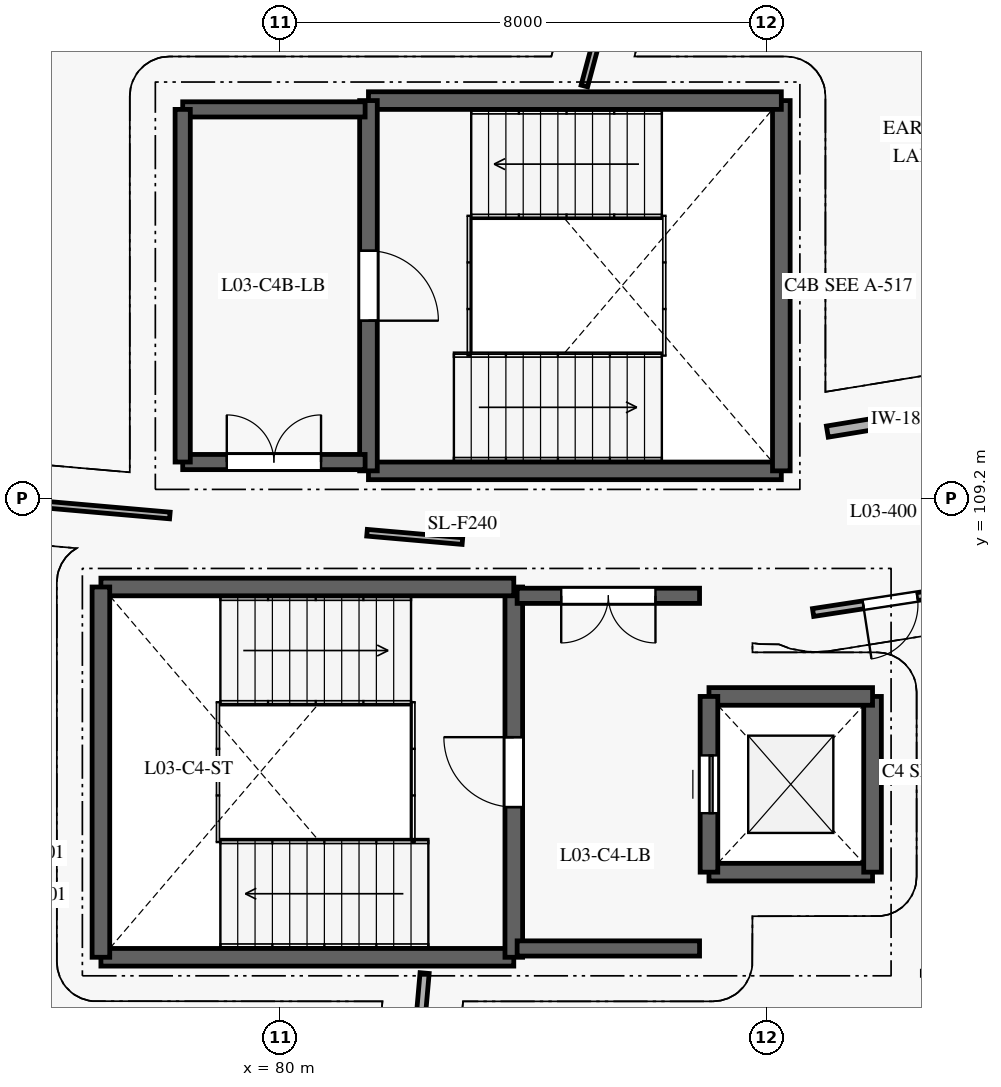
"""IFC4 building model, lengths in metres.
Left out: names, types, materials, properties, quantities, classifications, styles, units other than length and angle.
Written with IfcOpenShell. Run it as: python <this file> out.ifc"""

import sys

from ifc_helpers import new_model, si_unit, direction, frame, frame_2d, origin, place, context, subcontext, project, spatial, rectangle, extrude, element, fill, save


model = new_model("IFC4")
c1 = context("Model", 3, precision=1e-05, world=origin(), true_north=direction((0.0, 1.0)))
c2 = subcontext(c1, "Body", "Model", "MODEL_VIEW")
j1 = project(units=[si_unit("LENGTHUNIT", "METRE"), si_unit("PLANEANGLEUNIT", "RADIAN")], contexts=[c1])
p1 = place(None, origin())
s1 = spatial("IfcSite", under=j1, at=p1, CompositionType="ELEMENT")
p2 = place(p1, origin())
s2 = spatial("IfcBuilding", under=s1, at=p2, CompositionType="ELEMENT")
p3 = place(p2, frame((0.0, 0.0, 12.6)))
s3 = spatial("IfcBuildingStorey", under=s2, at=p3, CompositionType="ELEMENT", Elevation=12.6)
p4 = place(p3, frame((89.75, 120.396, 0.0), z_axis=(0.0, 0.0, 1.0), x_axis=(0.738102453677, -0.674688645136, 0.0)))
e1 = element("IfcWall", 1, at=p4, inside=s3, PredefinedType="SOLIDWALL", context=c2, shape_type="SweptSolid", body=[
    extrude(rectangle(XDim=7.122, YDim=0.425, at=frame_2d((3.561, 0.0))), origin(), (0.0, 0.0, 1.0), 3.94),
])
p5 = place(p4, frame((0.956, 0.0, 0.85)))
e2 = element("IfcOpeningElement", 2, at=p5, cuts=e1, PredefinedType="OPENING", context=c2, shape_type="SweptSolid", body=[
    extrude(rectangle(XDim=1.65, YDim=1.6, at=frame_2d((0.825, 0.8))), frame((0.0, 0.222, 0.0), z_axis=(0.0, -1.0, 0.0), x_axis=(1.0, 0.0, 0.0)), (0.0, 0.0, 1.0), 0.445),
])
p6 = place(p4, frame((3.911, 0.0, 0.85)))
e3 = element("IfcOpeningElement", 3, at=p6, cuts=e1, PredefinedType="OPENING", context=c2, shape_type="SweptSolid", body=[
    extrude(rectangle(XDim=0.85, YDim=1.4, at=frame_2d((0.425, 0.7))), frame((0.0, 0.222, 0.0), z_axis=(0.0, -1.0, 0.0), x_axis=(1.0, 0.0, 0.0)), (0.0, 0.0, 1.0), 0.445),
])
p7 = place(p3, frame((77.055, 101.655, 0.0), z_axis=(0.0, 0.0, 1.0), x_axis=(1.0, 0.0, 0.0)))
e4 = element("IfcWall", 4, at=p7, inside=s3, PredefinedType="SHEAR", context=c2, shape_type="SweptSolid", body=[
    extrude(rectangle(XDim=6.79, YDim=0.29, at=frame_2d((3.395, 0.0))), origin(), (0.0, 0.0, 1.0), 3.95),
])
p8 = place(p3, frame((83.845, 101.655, 0.0), z_axis=(0.0, 0.0, 1.0), x_axis=(0.0, 1.0, 0.0)))
e5 = element("IfcWall", 5, at=p8, inside=s3, PredefinedType="SHEAR", context=c2, shape_type="SweptSolid", body=[
    extrude(rectangle(XDim=6.09, YDim=0.29, at=frame_2d((3.045, 0.0))), origin(), (0.0, 0.0, 1.0), 3.95),
])
p9 = place(p8, frame((2.47, 0.0, 0.0)))
e6 = element("IfcOpeningElement", 6, at=p9, cuts=e5, PredefinedType="OPENING", context=c2, shape_type="SweptSolid", body=[
    extrude(rectangle(XDim=1.15, YDim=2.1, at=frame_2d((0.575, 1.05))), frame((0.0, 0.155, 0.0), z_axis=(0.0, -1.0, 0.0), x_axis=(1.0, 0.0, 0.0)), (0.0, 0.0, 1.0), 0.31),
])
p10 = place(p3, frame((83.845, 107.745, 0.0), z_axis=(0.0, 0.0, 1.0), x_axis=(-1.0, 0.0, 0.0)))
e7 = element("IfcWall", 7, at=p10, inside=s3, PredefinedType="SHEAR", context=c2, shape_type="SweptSolid", body=[
    extrude(rectangle(XDim=6.79, YDim=0.29, at=frame_2d((3.395, 0.0))), origin(), (0.0, 0.0, 1.0), 3.95),
])
p11 = place(p3, frame((77.055, 107.745, 0.0), z_axis=(0.0, 0.0, 1.0), x_axis=(0.0, -1.0, 0.0)))
e8 = element("IfcWall", 8, at=p11, inside=s3, PredefinedType="SHEAR", context=c2, shape_type="SweptSolid", body=[
    extrude(rectangle(XDim=6.09, YDim=0.29, at=frame_2d((3.045, 0.0))), origin(), (0.0, 0.0, 1.0), 3.95),
])
p12 = place(p3, frame((87.055, 103.055, 0.0), z_axis=(0.0, 0.0, 1.0), x_axis=(1.0, 0.0, 0.0)))
e9 = element("IfcWall", 9, at=p12, inside=s3, PredefinedType="SHEAR", context=c2, shape_type="SweptSolid", body=[
    extrude(rectangle(XDim=2.69, YDim=0.29, at=frame_2d((1.345, 0.0))), origin(), (0.0, 0.0, 1.0), 3.95),
])
p13 = place(p3, frame((89.745, 103.055, 0.0), z_axis=(0.0, 0.0, 1.0), x_axis=(0.0, 1.0, 0.0)))
e10 = element("IfcWall", 10, at=p13, inside=s3, PredefinedType="SHEAR", context=c2, shape_type="SweptSolid", body=[
    extrude(rectangle(XDim=2.89, YDim=0.29, at=frame_2d((1.445, 0.0))), origin(), (0.0, 0.0, 1.0), 3.95),
])
p14 = place(p3, frame((89.745, 105.945, 0.0), z_axis=(0.0, 0.0, 1.0), x_axis=(-1.0, 0.0, 0.0)))
e11 = element("IfcWall", 11, at=p14, inside=s3, PredefinedType="SHEAR", context=c2, shape_type="SweptSolid", body=[
    extrude(rectangle(XDim=2.69, YDim=0.29, at=frame_2d((1.345, 0.0))), origin(), (0.0, 0.0, 1.0), 3.95),
])
p15 = place(p3, frame((87.055, 105.945, 0.0), z_axis=(0.0, 0.0, 1.0), x_axis=(0.0, -1.0, 0.0)))
e12 = element("IfcWall", 12, at=p15, inside=s3, PredefinedType="SHEAR", context=c2, shape_type="SweptSolid", body=[
    extrude(rectangle(XDim=2.89, YDim=0.29, at=frame_2d((1.445, 0.0))), origin(), (0.0, 0.0, 1.0), 3.95),
])
p16 = place(p15, frame((0.97, 0.0, 0.0)))
e13 = element("IfcOpeningElement", 13, at=p16, cuts=e12, PredefinedType="OPENING", context=c2, shape_type="SweptSolid", body=[
    extrude(rectangle(XDim=0.95, YDim=2.1, at=frame_2d((0.475, 1.05))), frame((0.0, 0.155, 0.0), z_axis=(0.0, -1.0, 0.0), x_axis=(1.0, 0.0, 0.0)), (0.0, 0.0, 1.0), 0.31),
])
p17 = place(p3, frame((83.9, 101.8, 0.0), z_axis=(0.0, 0.0, 1.0), x_axis=(1.0, 0.0, 0.0)))
e14 = element("IfcWall", 14, at=p17, inside=s3, PredefinedType="SHEAR", context=c2, shape_type="SweptSolid", body=[
    extrude(rectangle(XDim=3.0, YDim=0.25, at=frame_2d((1.5, 0.0))), origin(), (0.0, 0.0, 1.0), 3.95),
])
p18 = place(p3, frame((86.9, 107.6, 0.0), z_axis=(0.0, 0.0, 1.0), x_axis=(-1.0, 0.0, 0.0)))
e15 = element("IfcWall", 15, at=p18, inside=s3, PredefinedType="SHEAR", context=c2, shape_type="SweptSolid", body=[
    extrude(rectangle(XDim=3.0, YDim=0.25, at=frame_2d((1.5, 0.0))), origin(), (0.0, 0.0, 1.0), 3.95),
])
p19 = place(p18, frame((0.725, 0.0, 0.0)))
e16 = element("IfcOpeningElement", 16, at=p19, cuts=e15, PredefinedType="OPENING", context=c2, shape_type="SweptSolid", body=[
    extrude(rectangle(XDim=1.55, YDim=2.15, at=frame_2d((0.775, 1.075))), frame((0.0, 0.135, 0.0), z_axis=(0.0, -1.0, 0.0), x_axis=(1.0, 0.0, 0.0)), (0.0, 0.0, 1.0), 0.27),
])
p20 = place(p3, frame((81.455, 109.655, 0.0), z_axis=(0.0, 0.0, 1.0), x_axis=(1.0, 0.0, 0.0)))
e17 = element("IfcWall", 17, at=p20, inside=s3, PredefinedType="SHEAR", context=c2, shape_type="SweptSolid", body=[
    extrude(rectangle(XDim=6.79, YDim=0.29, at=frame_2d((3.395, 0.0))), origin(), (0.0, 0.0, 1.0), 3.95),
])
p21 = place(p3, frame((88.245, 109.655, 0.0), z_axis=(0.0, 0.0, 1.0), x_axis=(0.0, 1.0, 0.0)))
e18 = element("IfcWall", 18, at=p21, inside=s3, PredefinedType="SHEAR", context=c2, shape_type="SweptSolid", body=[
    extrude(rectangle(XDim=6.09, YDim=0.29, at=frame_2d((3.045, 0.0))), origin(), (0.0, 0.0, 1.0), 3.95),
])
p22 = place(p3, frame((88.245, 115.745, 0.0), z_axis=(0.0, 0.0, 1.0), x_axis=(-1.0, 0.0, 0.0)))
e19 = element("IfcWall", 19, at=p22, inside=s3, PredefinedType="SHEAR", context=c2, shape_type="SweptSolid", body=[
    extrude(rectangle(XDim=6.79, YDim=0.29, at=frame_2d((3.395, 0.0))), origin(), (0.0, 0.0, 1.0), 3.95),
])
p23 = place(p3, frame((81.455, 115.745, 0.0), z_axis=(0.0, 0.0, 1.0), x_axis=(0.0, -1.0, 0.0)))
e20 = element("IfcWall", 20, at=p23, inside=s3, PredefinedType="SHEAR", context=c2, shape_type="SweptSolid", body=[
    extrude(rectangle(XDim=6.09, YDim=0.29, at=frame_2d((3.045, 0.0))), origin(), (0.0, 0.0, 1.0), 3.95),
])
p24 = place(p23, frame((2.47, 0.0, 0.0)))
e21 = element("IfcOpeningElement", 21, at=p24, cuts=e20, PredefinedType="OPENING", context=c2, shape_type="SweptSolid", body=[
    extrude(rectangle(XDim=1.15, YDim=2.1, at=frame_2d((0.575, 1.05))), frame((0.0, 0.155, 0.0), z_axis=(0.0, -1.0, 0.0), x_axis=(1.0, 0.0, 0.0)), (0.0, 0.0, 1.0), 0.31),
])
p25 = place(p3, frame((78.4, 109.8, 0.0), z_axis=(0.0, 0.0, 1.0), x_axis=(1.0, 0.0, 0.0)))
e22 = element("IfcWall", 22, at=p25, inside=s3, PredefinedType="SHEAR", context=c2, shape_type="SweptSolid", body=[
    extrude(rectangle(XDim=3.0, YDim=0.25, at=frame_2d((1.5, 0.0))), origin(), (0.0, 0.0, 1.0), 3.95),
])
p26 = place(p25, frame((0.725, 0.0, 0.0)))
e23 = element("IfcOpeningElement", 23, at=p26, cuts=e22, PredefinedType="OPENING", context=c2, shape_type="SweptSolid", body=[
    extrude(rectangle(XDim=1.55, YDim=2.15, at=frame_2d((0.775, 1.075))), frame((0.0, 0.135, 0.0), z_axis=(0.0, -1.0, 0.0), x_axis=(1.0, 0.0, 0.0)), (0.0, 0.0, 1.0), 0.27),
])
p27 = place(p3, frame((81.4, 115.6, 0.0), z_axis=(0.0, 0.0, 1.0), x_axis=(-1.0, 0.0, 0.0)))
e24 = element("IfcWall", 24, at=p27, inside=s3, PredefinedType="SHEAR", context=c2, shape_type="SweptSolid", body=[
    extrude(rectangle(XDim=3.0, YDim=0.25, at=frame_2d((1.5, 0.0))), origin(), (0.0, 0.0, 1.0), 3.95),
])
p28 = place(p3, frame((78.4, 115.6, 0.0), z_axis=(0.0, 0.0, 1.0), x_axis=(0.0, -1.0, 0.0)))
e25 = element("IfcWall", 25, at=p28, inside=s3, PredefinedType="SHEAR", context=c2, shape_type="SweptSolid", body=[
    extrude(rectangle(XDim=5.8, YDim=0.25, at=frame_2d((2.9, 0.0))), origin(), (0.0, 0.0, 1.0), 3.95),
])
p29 = place(p3, frame((69.888, 109.647, 0.0), z_axis=(0.0, 0.0, 1.0), x_axis=(0.996193494864, -0.087169494609, 0.0)))
e26 = element("IfcWall", 26, at=p29, inside=s3, PredefinedType="PARTITIONING", context=c2, shape_type="SweptSolid", body=[
    extrude(rectangle(XDim=8.332, YDim=0.11, at=frame_2d((4.166, 0.0))), origin(), (0.0, 0.0, 1.0), 3.94),
])
p30 = place(p29, frame((3.626, 0.0, 0.0)))
e27 = element("IfcOpeningElement", 27, at=p30, cuts=e26, PredefinedType="OPENING", context=c2, shape_type="SweptSolid", body=[
    extrude(rectangle(XDim=1.08, YDim=2.12, at=frame_2d((0.54, 1.06))), frame((0.0, 0.065, 0.0), z_axis=(0.0, -1.0, 0.0), x_axis=(1.0, 0.0, 0.0)), (0.0, 0.0, 1.0), 0.13),
])
p31 = place(p3, frame((81.431, 108.637, 0.0), z_axis=(0.0, 0.0, 1.0), x_axis=(0.996196241539, -0.08713809926, 0.0)))
e28 = element("IfcWall", 28, at=p31, inside=s3, PredefinedType="PARTITIONING", context=c2, shape_type="SweptSolid", body=[
    extrude(rectangle(XDim=1.575, YDim=0.11, at=frame_2d((0.787, 0.0))), origin(), (0.0, 0.0, 1.0), 3.94),
])
p32 = place(p3, frame((85.006, 115.985, 0.0), z_axis=(0.0, 0.0, 1.0), x_axis=(0.258806589257, 0.965929163737, 0.0)))
e29 = element("IfcWall", 29, at=p32, inside=s3, PredefinedType="PARTITIONING", context=c2, shape_type="SweptSolid", body=[
    extrude(rectangle(XDim=5.366, YDim=0.11, at=frame_2d((2.683, 0.0))), origin(), (0.0, 0.0, 1.0), 3.94),
])
p33 = place(p3, frame((81.834, 95.176, 0.0), z_axis=(0.0, 0.0, 1.0), x_axis=(0.08716792051, 0.996193632601, 0.0)))
e30 = element("IfcWall", 30, at=p33, inside=s3, PredefinedType="PARTITIONING", context=c2, shape_type="SweptSolid", body=[
    extrude(rectangle(XDim=6.243, YDim=0.15, at=frame_2d((3.122, 0.0))), origin(), (0.0, 0.0, 1.0), 3.94),
])
p34 = place(p33, frame((2.662, 0.0, 0.0)))
e31 = element("IfcOpeningElement", 31, at=p34, cuts=e30, PredefinedType="OPENING", context=c2, shape_type="SweptSolid", body=[
    extrude(rectangle(XDim=0.92, YDim=2.08, at=frame_2d((0.46, 1.04))), frame((0.0, 0.085, 0.0), z_axis=(0.0, -1.0, 0.0), x_axis=(1.0, 0.0, 0.0)), (0.0, 0.0, 1.0), 0.17),
])
p35 = place(p3, frame((91.306, 107.714, 0.0), z_axis=(0.0, 0.0, 1.0), x_axis=(-0.988481340726, -0.151342786539, 0.0)))
e32 = element("IfcWall", 32, at=p35, inside=s3, PredefinedType="PARTITIONING", context=c2, shape_type="SweptSolid", body=[
    extrude(rectangle(XDim=2.568, YDim=0.13, at=frame_2d((1.284, 0.0))), origin(), (0.0, 0.0, 1.0), 3.94),
])
p36 = place(p35, frame((0.834, 0.0, 0.0)))
e33 = element("IfcOpeningElement", 33, at=p36, cuts=e32, PredefinedType="OPENING", context=c2, shape_type="SweptSolid", body=[
    extrude(rectangle(XDim=0.9, YDim=2.05, at=frame_2d((0.45, 1.025))), frame((0.0, 0.075, 0.0), z_axis=(0.0, -1.0, 0.0), x_axis=(1.0, 0.0, 0.0)), (0.0, 0.0, 1.0), 0.15),
])
p37 = place(p3, frame((89.002, 110.301, 0.0), z_axis=(0.0, 0.0, 1.0), x_axis=(0.986819802975, 0.161822978763, 0.0)))
e34 = element("IfcWall", 34, at=p37, inside=s3, PredefinedType="PARTITIONING", context=c2, shape_type="SweptSolid", body=[
    extrude(rectangle(XDim=6.502, YDim=0.185, at=frame_2d((3.251, 0.0))), origin(), (0.0, 0.0, 1.0), 3.94),
])
p38 = place(p37, frame((2.571, 0.0, 0.0)))
e35 = element("IfcOpeningElement", 35, at=p38, cuts=e34, PredefinedType="OPENING", context=c2, shape_type="SweptSolid", body=[
    extrude(rectangle(XDim=1.36, YDim=2.14, at=frame_2d((0.68, 1.07))), frame((0.0, 0.103, 0.0), z_axis=(0.0, -1.0, 0.0), x_axis=(1.0, 0.0, 0.0)), (0.0, 0.0, 1.0), 0.205),
])
p39 = place(p9, origin())
e36 = element("IfcDoor", 36, at=p39, inside=s3, OperationType="SINGLE_SWING_RIGHT", PredefinedType="DOOR", context=c2, shape_type="SweptSolid", body=[
    extrude(rectangle(XDim=1.15, YDim=2.1, at=frame_2d((0.575, 1.05))), frame((0.0, 0.025, 0.0), z_axis=(0.0, -1.0, 0.0), x_axis=(1.0, 0.0, 0.0)), (0.0, 0.0, 1.0), 0.05),
])
fill(e6, e36)
p40 = place(p16, frame((0.95, 0.0, 0.0), z_axis=(0.0, 0.0, 1.0), x_axis=(-1.0, 0.0, 0.0)))
e37 = element("IfcDoor", 37, at=p40, inside=s3, OperationType="SLIDING_TO_LEFT", PredefinedType="DOOR", context=c2, shape_type="SweptSolid", body=[
    extrude(rectangle(XDim=0.95, YDim=2.1, at=frame_2d((0.475, 1.05))), frame((0.0, 0.025, 0.0), z_axis=(0.0, -1.0, 0.0), x_axis=(1.0, 0.0, 0.0)), (0.0, 0.0, 1.0), 0.05),
])
fill(e13, e37)
p41 = place(p19, origin())
e38 = element("IfcDoor", 38, at=p41, inside=s3, OperationType="DOUBLE_DOOR_SINGLE_SWING", PredefinedType="DOOR", context=c2, shape_type="SweptSolid", body=[
    extrude(rectangle(XDim=1.55, YDim=2.15, at=frame_2d((0.775, 1.075))), frame((0.0, 0.025, 0.0), z_axis=(0.0, -1.0, 0.0), x_axis=(1.0, 0.0, 0.0)), (0.0, 0.0, 1.0), 0.05),
])
fill(e16, e38)
p42 = place(p24, origin())
e39 = element("IfcDoor", 39, at=p42, inside=s3, OperationType="SINGLE_SWING_RIGHT", PredefinedType="DOOR", context=c2, shape_type="SweptSolid", body=[
    extrude(rectangle(XDim=1.15, YDim=2.1, at=frame_2d((0.575, 1.05))), frame((0.0, 0.025, 0.0), z_axis=(0.0, -1.0, 0.0), x_axis=(1.0, 0.0, 0.0)), (0.0, 0.0, 1.0), 0.05),
])
fill(e21, e39)
p43 = place(p26, origin())
e40 = element("IfcDoor", 40, at=p43, inside=s3, OperationType="DOUBLE_DOOR_SINGLE_SWING", PredefinedType="DOOR", context=c2, shape_type="SweptSolid", body=[
    extrude(rectangle(XDim=1.55, YDim=2.15, at=frame_2d((0.775, 1.075))), frame((0.0, 0.025, 0.0), z_axis=(0.0, -1.0, 0.0), x_axis=(1.0, 0.0, 0.0)), (0.0, 0.0, 1.0), 0.05),
])
fill(e23, e40)
p44 = place(p36, origin())
e41 = element("IfcDoor", 41, at=p44, inside=s3, OperationType="SINGLE_SWING_RIGHT", PredefinedType="DOOR", context=c2, shape_type="SweptSolid", body=[
    extrude(rectangle(XDim=0.9, YDim=2.05, at=frame_2d((0.45, 1.025))), frame((0.0, 0.025, 0.0), z_axis=(0.0, -1.0, 0.0), x_axis=(1.0, 0.0, 0.0)), (0.0, 0.0, 1.0), 0.05),
])
fill(e33, e41)
save(model, sys.argv[1])
